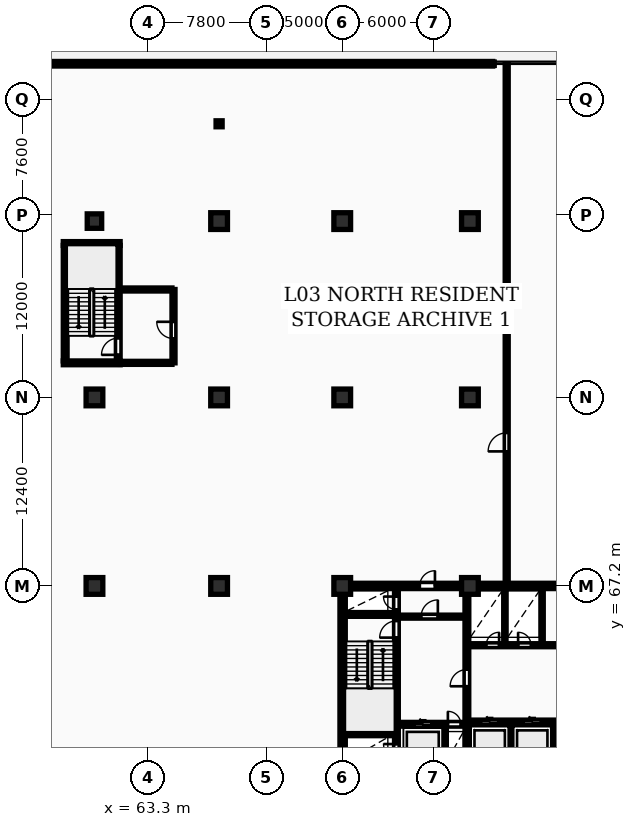
"""IFC4 building model, lengths in metres.
Left out: names, types, materials, properties, quantities, classifications, styles, units other than length and angle.
Written with IfcOpenShell. Run it as: python <this file> out.ifc"""

import sys

from ifc_helpers import new_model, si_unit, direction, frame, frame_2d, origin, origin_2d, place, context, subcontext, project, spatial, rectangle, circle, i_section, extrude, element, fill, save


model = new_model("IFC4")
c1 = context("Model", 3, precision=1e-05, world=origin(), true_north=direction((0.0, 1.0)))
c2 = subcontext(c1, "Body", "Model", "MODEL_VIEW")
j1 = project(units=[si_unit("LENGTHUNIT", "METRE"), si_unit("PLANEANGLEUNIT", "RADIAN")], contexts=[c1])
p1 = place(None, origin())
s1 = spatial("IfcSite", under=j1, at=p1, CompositionType="ELEMENT")
p2 = place(p1, origin())
s2 = spatial("IfcBuilding", under=s1, at=p2, CompositionType="ELEMENT")
p3 = place(p2, frame((0.0, 0.0, 14.5)))
s3 = spatial("IfcBuildingStorey", under=s2, at=p3, CompositionType="ELEMENT", Elevation=14.5)
for number, where, z_axis, x_axis in (
    (1, (59.8, 67.2, 0.0), (0.0, 0.0, 1.0), (1.0, 0.0, 0.0)),
    (2, (59.8, 79.6, 0.0), (0.0, 0.0, 1.0), (1.0, 0.0, 0.0)),
):
    element("IfcColumn", number, at=place(p3, frame(where, z_axis=z_axis, x_axis=x_axis)), inside=s3, PredefinedType="COLUMN", context=c2, shape_type="SweptSolid", body=[
        extrude(rectangle(XDim=1.1, YDim=1.1, at=origin_2d()), origin(), (0.0, 0.0, 1.0), 4.5),
    ])
p4 = place(p3, frame((59.8, 91.2, 0.0), z_axis=(0.0, 0.0, 1.0), x_axis=(1.0, 0.0, 0.0)))
e3 = element("IfcColumn", 3, at=p4, inside=s3, PredefinedType="COLUMN", context=c2, shape_type="SweptSolid", body=[
    extrude(circle(Radius=0.475, at=origin_2d()), origin(), (0.0, 0.0, 1.0), 4.5),
])
for number, where, z_axis, x_axis in (
    (4, (68.0, 67.2, 0.0), (0.0, 0.0, 1.0), (1.0, 0.0, 0.0)),
    (5, (68.0, 79.6, 0.0), (0.0, 0.0, 1.0), (1.0, 0.0, 0.0)),
    (6, (68.0, 91.2, 0.0), (0.0, 0.0, 1.0), (1.0, 0.0, 0.0)),
    (7, (76.1, 67.2, 0.0), (0.0, 0.0, 1.0), (1.0, 0.0, 0.0)),
    (8, (76.1, 79.6, 0.0), (0.0, 0.0, 1.0), (1.0, 0.0, 0.0)),
    (9, (76.1, 91.2, 0.0), (0.0, 0.0, 1.0), (1.0, 0.0, 0.0)),
    (10, (84.5, 67.2, 0.0), (0.0, 0.0, 1.0), (1.0, 0.0, 0.0)),
    (11, (84.5, 79.6, 0.0), (0.0, 0.0, 1.0), (1.0, 0.0, 0.0)),
    (12, (84.5, 91.2, 0.0), (0.0, 0.0, 1.0), (1.0, 0.0, 0.0)),
):
    element("IfcColumn", number, at=place(p3, frame(where, z_axis=z_axis, x_axis=x_axis)), inside=s3, PredefinedType="COLUMN", context=c2, shape_type="SweptSolid", body=[
        extrude(rectangle(XDim=1.1, YDim=1.1, at=origin_2d()), origin(), (0.0, 0.0, 1.0), 4.5),
    ])
p5 = place(p3, frame((68.0, 97.6, 0.0), z_axis=(0.0, 0.0, 1.0), x_axis=(1.0, 0.0, 0.0)))
e13 = element("IfcColumn", 13, at=p5, inside=s3, PredefinedType="COLUMN", context=c2, shape_type="SweptSolid", body=[
    extrude(i_section(OverallWidth=0.399, OverallDepth=0.394, WebThickness=0.023, FlangeThickness=0.037, FilletRadius=0.015, at=origin_2d()), origin(), (0.0, 0.0, 1.0), 4.5),
])
p6 = place(p3, frame((86.0, 101.55, 0.0), z_axis=(0.0, 0.0, 1.0), x_axis=(-1.0, 0.0, 0.0)))
e14 = element("IfcWall", 14, at=p6, inside=s3, PredefinedType="STANDARD", context=c2, shape_type="SweptSolid", body=[
    extrude(rectangle(XDim=34.5, YDim=0.3, at=frame_2d((17.25, 0.0))), origin(), (0.0, 0.0, 1.0), 4.18),
])
p7 = place(p3, frame((76.125, 55.375, 0.0), z_axis=(0.0, 0.0, 1.0), x_axis=(0.0, 1.0, 0.0)))
e15 = element("IfcWall", 15, at=p7, inside=s3, PredefinedType="SHEAR", context=c2, shape_type="SweptSolid", body=[
    extrude(rectangle(XDim=11.65, YDim=0.35, at=frame_2d((5.825, 0.0))), origin(), (0.0, 0.0, 1.0), 4.5),
])
p8 = place(p3, frame((75.95, 67.2, 0.0), z_axis=(0.0, 0.0, 1.0), x_axis=(1.0, 0.0, 0.0)))
e16 = element("IfcWall", 16, at=p8, inside=s3, PredefinedType="SHEAR", context=c2, shape_type="SweptSolid", body=[
    extrude(rectangle(XDim=36.3, YDim=0.35, at=frame_2d((18.15, 0.0))), origin(), (0.0, 0.0, 1.0), 4.5),
])
p9 = place(p8, frame((5.25, 0.0, 0.0)))
e17 = element("IfcOpeningElement", 17, at=p9, cuts=e16, PredefinedType="OPENING", context=c2, shape_type="SweptSolid", body=[
    extrude(rectangle(XDim=1.0, YDim=2.15, at=frame_2d((0.5, 1.075))), frame((0.0, 0.185, 0.0), z_axis=(0.0, -1.0, 0.0), x_axis=(1.0, 0.0, 0.0)), (0.0, 0.0, 1.0), 0.37),
])
p10 = place(p8, frame((21.6, 0.0, 0.0)))
e18 = element("IfcOpeningElement", 18, at=p10, cuts=e16, PredefinedType="OPENING", context=c2, shape_type="SweptSolid", body=[
    extrude(rectangle(XDim=1.5, YDim=2.2, at=frame_2d((0.75, 1.1))), frame((0.0, 0.185, 0.0), z_axis=(0.0, -1.0, 0.0), x_axis=(1.0, 0.0, 0.0)), (0.0, 0.0, 1.0), 0.37),
])
p11 = place(p8, frame((30.45, 0.0, 0.0)))
e19 = element("IfcOpeningElement", 19, at=p11, cuts=e16, PredefinedType="OPENING", context=c2, shape_type="SweptSolid", body=[
    extrude(rectangle(XDim=1.0, YDim=2.15, at=frame_2d((0.5, 1.075))), frame((0.0, 0.185, 0.0), z_axis=(0.0, -1.0, 0.0), x_axis=(1.0, 0.0, 0.0)), (0.0, 0.0, 1.0), 0.37),
])
p12 = place(p3, frame((79.665, 55.4, 0.0), z_axis=(0.0, 0.0, 1.0), x_axis=(0.0, 1.0, 0.0)))
e20 = element("IfcWall", 20, at=p12, inside=s3, PredefinedType="SHEAR", context=c2, shape_type="SweptSolid", body=[
    extrude(rectangle(XDim=11.6, YDim=0.25, at=frame_2d((5.8, 0.0))), origin(), (0.0, 0.0, 1.0), 4.5),
])
p13 = place(p12, frame((0.55, 0.0, 0.0)))
e21 = element("IfcOpeningElement", 21, at=p13, cuts=e20, PredefinedType="OPENING", context=c2, shape_type="SweptSolid", body=[
    extrude(rectangle(XDim=0.85, YDim=2.05, at=frame_2d((0.425, 1.025))), frame((0.0, 0.135, 0.0), z_axis=(0.0, -1.0, 0.0), x_axis=(1.0, 0.0, 0.0)), (0.0, 0.0, 1.0), 0.27),
])
p14 = place(p12, frame((8.4, 0.0, 0.0)))
e22 = element("IfcOpeningElement", 22, at=p14, cuts=e20, PredefinedType="OPENING", context=c2, shape_type="SweptSolid", body=[
    extrude(rectangle(XDim=1.1, YDim=2.1, at=frame_2d((0.55, 1.05))), frame((0.0, 0.135, 0.0), z_axis=(0.0, -1.0, 0.0), x_axis=(1.0, 0.0, 0.0)), (0.0, 0.0, 1.0), 0.27),
])
p15 = place(p12, frame((10.25, 0.0, 0.0)))
e23 = element("IfcOpeningElement", 23, at=p15, cuts=e20, PredefinedType="OPENING", context=c2, shape_type="SweptSolid", body=[
    extrude(rectangle(XDim=0.85, YDim=2.05, at=frame_2d((0.425, 1.025))), frame((0.0, 0.135, 0.0), z_axis=(0.0, -1.0, 0.0), x_axis=(1.0, 0.0, 0.0)), (0.0, 0.0, 1.0), 0.27),
])
for number, where, z_axis, x_axis in (
    (24, (76.3, 57.475, 0.0), (0.0, 0.0, 1.0), (1.0, 0.0, 0.0)),
    (25, (76.3, 65.325, 0.0), (0.0, 0.0, 1.0), (1.0, 0.0, 0.0)),
):
    element("IfcWall", number, at=place(p3, frame(where, z_axis=z_axis, x_axis=x_axis)), inside=s3, PredefinedType="SHEAR", context=c2, shape_type="SweptSolid", body=[
        extrude(rectangle(XDim=3.24, YDim=0.25, at=frame_2d((1.62, 0.0))), origin(), (0.0, 0.0, 1.0), 4.5),
    ])
p16 = place(p3, frame((79.79, 58.1, 0.0), z_axis=(0.0, 0.0, 1.0), x_axis=(1.0, 0.0, 0.0)))
e26 = element("IfcWall", 26, at=p16, inside=s3, PredefinedType="SHEAR", context=c2, shape_type="SweptSolid", body=[
    extrude(rectangle(XDim=4.39, YDim=0.25, at=frame_2d((2.195, 0.0))), origin(), (0.0, 0.0, 1.0), 4.5),
])
p17 = place(p16, frame((1.05, 0.0, 0.0)))
e27 = element("IfcOpeningElement", 27, at=p17, cuts=e26, PredefinedType="OPENING", context=c2, shape_type="SweptSolid", body=[
    extrude(rectangle(XDim=1.12, YDim=2.12, at=frame_2d((0.56, 1.06))), frame((0.0, 0.135, 0.0), z_axis=(0.0, -1.0, 0.0), x_axis=(1.0, 0.0, 0.0)), (0.0, 0.0, 1.0), 0.27),
])
p18 = place(p16, frame((3.26, 0.0, 0.0)))
e28 = element("IfcOpeningElement", 28, at=p18, cuts=e26, PredefinedType="OPENING", context=c2, shape_type="SweptSolid", body=[
    extrude(rectangle(XDim=0.85, YDim=2.05, at=frame_2d((0.425, 1.025))), frame((0.0, 0.135, 0.0), z_axis=(0.0, -1.0, 0.0), x_axis=(1.0, 0.0, 0.0)), (0.0, 0.0, 1.0), 0.27),
])
p19 = place(p3, frame((82.85, 55.4, 0.0), z_axis=(0.0, 0.0, 1.0), x_axis=(0.0, 1.0, 0.0)))
e29 = element("IfcWall", 29, at=p19, inside=s3, PredefinedType="PARTITIONING", context=c2, shape_type="SweptSolid", body=[
    extrude(rectangle(XDim=2.56, YDim=0.2, at=frame_2d((1.28, 0.0))), origin(), (0.0, 0.0, 1.0), 4.18),
])
p20 = place(p3, frame((79.79, 65.18, 0.0), z_axis=(0.0, 0.0, 1.0), x_axis=(1.0, 0.0, 0.0)))
e30 = element("IfcWall", 30, at=p20, inside=s3, PredefinedType="PARTITIONING", context=c2, shape_type="SweptSolid", body=[
    extrude(rectangle(XDim=4.39, YDim=0.2, at=frame_2d((2.195, 0.0))), origin(), (0.0, 0.0, 1.0), 4.18),
])
p21 = place(p20, frame((1.5, 0.0, 0.0)))
e31 = element("IfcOpeningElement", 31, at=p21, cuts=e30, PredefinedType="OPENING", context=c2, shape_type="SweptSolid", body=[
    extrude(rectangle(XDim=1.1, YDim=2.1, at=frame_2d((0.55, 1.05))), frame((0.0, 0.11, 0.0), z_axis=(0.0, -1.0, 0.0), x_axis=(1.0, 0.0, 0.0)), (0.0, 0.0, 1.0), 0.22),
])
p22 = place(p3, frame((84.3, 55.4, 0.0), z_axis=(0.0, 0.0, 1.0), x_axis=(0.0, 1.0, 0.0)))
e32 = element("IfcWall", 32, at=p22, inside=s3, PredefinedType="SHEAR", context=c2, shape_type="SweptSolid", body=[
    extrude(rectangle(XDim=11.6, YDim=0.25, at=frame_2d((5.8, 0.0))), origin(), (0.0, 0.0, 1.0), 4.5),
])
p23 = place(p22, frame((5.2, 0.0, 0.0)))
e33 = element("IfcOpeningElement", 33, at=p23, cuts=e32, PredefinedType="OPENING", context=c2, shape_type="SweptSolid", body=[
    extrude(rectangle(XDim=1.1, YDim=2.1, at=frame_2d((0.55, 1.05))), frame((0.0, 0.135, 0.0), z_axis=(0.0, -1.0, 0.0), x_axis=(1.0, 0.0, 0.0)), (0.0, 0.0, 1.0), 0.27),
])
for number, where, z_axis, x_axis in (
    (34, (87.2, 55.4, 0.0), (0.0, 0.0, 1.0), (0.0, 1.0, 0.0)),
    (35, (90.0, 55.4, 0.0), (0.0, 0.0, 1.0), (0.0, 1.0, 0.0)),
):
    element("IfcWall", number, at=place(p3, frame(where, z_axis=z_axis, x_axis=x_axis)), inside=s3, PredefinedType="PARTITIONING", context=c2, shape_type="SweptSolid", body=[
        extrude(rectangle(XDim=2.72, YDim=0.2, at=frame_2d((1.36, 0.0))), origin(), (0.0, 0.0, 1.0), 4.18),
    ])
p24 = place(p3, frame((84.42, 58.25, 0.0), z_axis=(0.0, 0.0, 1.0), x_axis=(1.0, 0.0, 0.0)))
e36 = element("IfcWall", 36, at=p24, inside=s3, PredefinedType="SHEAR", context=c2, shape_type="SweptSolid", body=[
    extrude(rectangle(XDim=8.36, YDim=0.25, at=frame_2d((4.18, 0.0))), origin(), (0.0, 0.0, 1.0), 4.5),
])
p25 = place(p24, frame((0.82, 0.0, 0.0)))
e37 = element("IfcOpeningElement", 37, at=p25, cuts=e36, PredefinedType="OPENING", context=c2, shape_type="SweptSolid", body=[
    extrude(rectangle(XDim=1.12, YDim=2.12, at=frame_2d((0.56, 1.06))), frame((0.0, 0.135, 0.0), z_axis=(0.0, -1.0, 0.0), x_axis=(1.0, 0.0, 0.0)), (0.0, 0.0, 1.0), 0.27),
])
p26 = place(p24, frame((3.62, 0.0, 0.0)))
e38 = element("IfcOpeningElement", 38, at=p26, cuts=e36, PredefinedType="OPENING", context=c2, shape_type="SweptSolid", body=[
    extrude(rectangle(XDim=1.12, YDim=2.12, at=frame_2d((0.56, 1.06))), frame((0.0, 0.135, 0.0), z_axis=(0.0, -1.0, 0.0), x_axis=(1.0, 0.0, 0.0)), (0.0, 0.0, 1.0), 0.27),
])
p27 = place(p24, frame((6.42, 0.0, 0.0)))
e39 = element("IfcOpeningElement", 39, at=p27, cuts=e36, PredefinedType="OPENING", context=c2, shape_type="SweptSolid", body=[
    extrude(rectangle(XDim=1.12, YDim=2.12, at=frame_2d((0.56, 1.06))), frame((0.0, 0.135, 0.0), z_axis=(0.0, -1.0, 0.0), x_axis=(1.0, 0.0, 0.0)), (0.0, 0.0, 1.0), 0.27),
])
for number, where, z_axis, x_axis in (
    (40, (86.8, 63.4, 0.0), (0.0, 0.0, 1.0), (0.0, 1.0, 0.0)),
    (41, (89.25, 63.4, 0.0), (0.0, 0.0, 1.0), (0.0, 1.0, 0.0)),
):
    element("IfcWall", number, at=place(p3, frame(where, z_axis=z_axis, x_axis=x_axis)), inside=s3, PredefinedType="PARTITIONING", context=c2, shape_type="SweptSolid", body=[
        extrude(rectangle(XDim=3.6, YDim=0.15, at=frame_2d((1.8, 0.0))), origin(), (0.0, 0.0, 1.0), 4.18),
    ])
p28 = place(p3, frame((84.42, 63.3, 0.0), z_axis=(0.0, 0.0, 1.0), x_axis=(1.0, 0.0, 0.0)))
e42 = element("IfcWall", 42, at=p28, inside=s3, PredefinedType="PARTITIONING", context=c2, shape_type="SweptSolid", body=[
    extrude(rectangle(XDim=19.83, YDim=0.2, at=frame_2d((9.915, 0.0))), origin(), (0.0, 0.0, 1.0), 4.18),
])
p29 = place(p28, frame((1.15, 0.0, 0.0)))
e43 = element("IfcOpeningElement", 43, at=p29, cuts=e42, PredefinedType="OPENING", context=c2, shape_type="SweptSolid", body=[
    extrude(rectangle(XDim=0.85, YDim=2.05, at=frame_2d((0.425, 1.025))), frame((0.0, 0.11, 0.0), z_axis=(0.0, -1.0, 0.0), x_axis=(1.0, 0.0, 0.0)), (0.0, 0.0, 1.0), 0.22),
])
p30 = place(p28, frame((3.25, 0.0, 0.0)))
e44 = element("IfcOpeningElement", 44, at=p30, cuts=e42, PredefinedType="OPENING", context=c2, shape_type="SweptSolid", body=[
    extrude(rectangle(XDim=0.85, YDim=2.05, at=frame_2d((0.425, 1.025))), frame((0.0, 0.11, 0.0), z_axis=(0.0, -1.0, 0.0), x_axis=(1.0, 0.0, 0.0)), (0.0, 0.0, 1.0), 0.22),
])
p31 = place(p28, frame((13.08, 0.0, 0.0)))
e45 = element("IfcOpeningElement", 45, at=p31, cuts=e42, PredefinedType="OPENING", context=c2, shape_type="SweptSolid", body=[
    extrude(rectangle(XDim=1.5, YDim=2.2, at=frame_2d((0.75, 1.1))), frame((0.0, 0.11, 0.0), z_axis=(0.0, -1.0, 0.0), x_axis=(1.0, 0.0, 0.0)), (0.0, 0.0, 1.0), 0.22),
])
p32 = place(p28, frame((6.78, 0.0, 0.0)))
e46 = element("IfcOpeningElement", 46, at=p32, cuts=e42, PredefinedType="OPENING", context=c2, shape_type="SweptSolid", body=[
    extrude(rectangle(XDim=0.92, YDim=2.08, at=frame_2d((0.46, 1.04))), frame((0.0, 0.11, 0.0), z_axis=(0.0, -1.0, 0.0), x_axis=(1.0, 0.0, 0.0)), (0.0, 0.0, 1.0), 0.22),
])
p33 = place(p28, frame((16.28, 0.0, 0.0)))
e47 = element("IfcOpeningElement", 47, at=p33, cuts=e42, PredefinedType="OPENING", context=c2, shape_type="SweptSolid", body=[
    extrude(rectangle(XDim=0.92, YDim=2.08, at=frame_2d((0.46, 1.04))), frame((0.0, 0.11, 0.0), z_axis=(0.0, -1.0, 0.0), x_axis=(1.0, 0.0, 0.0)), (0.0, 0.0, 1.0), 0.22),
])
p34 = place(p3, frame((57.875, 82.0, 0.0), z_axis=(0.0, 0.0, 1.0), x_axis=(0.0, 1.0, 0.0)))
e48 = element("IfcWall", 48, at=p34, inside=s3, PredefinedType="SHEAR", context=c2, shape_type="SweptSolid", body=[
    extrude(rectangle(XDim=7.6, YDim=0.25, at=frame_2d((3.8, 0.0))), origin(), (0.0, 0.0, 1.0), 4.5),
])
for number, where, z_axis, x_axis in (
    (49, (57.75, 81.875, 0.0), (0.0, 0.0, 1.0), (1.0, 0.0, 0.0)),
    (50, (57.75, 89.725, 0.0), (0.0, 0.0, 1.0), (1.0, 0.0, 0.0)),
):
    element("IfcWall", number, at=place(p3, frame(where, z_axis=z_axis, x_axis=x_axis)), inside=s3, PredefinedType="SHEAR", context=c2, shape_type="SweptSolid", body=[
        extrude(rectangle(XDim=3.74, YDim=0.25, at=frame_2d((1.87, 0.0))), origin(), (0.0, 0.0, 1.0), 4.5),
    ])
p35 = place(p3, frame((61.365, 82.0, 0.0), z_axis=(0.0, 0.0, 1.0), x_axis=(0.0, 1.0, 0.0)))
e51 = element("IfcWall", 51, at=p35, inside=s3, PredefinedType="SHEAR", context=c2, shape_type="SweptSolid", body=[
    extrude(rectangle(XDim=7.6, YDim=0.25, at=frame_2d((3.8, 0.0))), origin(), (0.0, 0.0, 1.0), 4.5),
])
p36 = place(p35, frame((0.4, 0.0, 0.0)))
e52 = element("IfcOpeningElement", 52, at=p36, cuts=e51, PredefinedType="OPENING", context=c2, shape_type="SweptSolid", body=[
    extrude(rectangle(XDim=1.1, YDim=2.1, at=frame_2d((0.55, 1.05))), frame((0.0, 0.135, 0.0), z_axis=(0.0, -1.0, 0.0), x_axis=(1.0, 0.0, 0.0)), (0.0, 0.0, 1.0), 0.27),
])
p37 = place(p3, frame((65.0, 81.875, 0.0), z_axis=(0.0, 0.0, 1.0), x_axis=(0.0, 1.0, 0.0)))
e53 = element("IfcWall", 53, at=p37, inside=s3, PredefinedType="PARTITIONING", context=c2, shape_type="SweptSolid", body=[
    extrude(rectangle(XDim=4.825, YDim=0.2, at=frame_2d((2.413, 0.0))), origin(), (0.0, 0.0, 1.0), 4.18),
])
p38 = place(p37, frame((1.6, 0.0, 0.0)))
e54 = element("IfcOpeningElement", 54, at=p38, cuts=e53, PredefinedType="OPENING", context=c2, shape_type="SweptSolid", body=[
    extrude(rectangle(XDim=1.1, YDim=2.15, at=frame_2d((0.55, 1.075))), frame((0.0, 0.11, 0.0), z_axis=(0.0, -1.0, 0.0), x_axis=(1.0, 0.0, 0.0)), (0.0, 0.0, 1.0), 0.22),
])
for number, where, z_axis, x_axis in (
    (55, (61.5, 81.875, 0.0), (0.0, 0.0, 1.0), (1.0, 0.0, 0.0)),
    (56, (61.5, 86.7, 0.0), (0.0, 0.0, 1.0), (1.0, 0.0, 0.0)),
):
    element("IfcWall", number, at=place(p3, frame(where, z_axis=z_axis, x_axis=x_axis)), inside=s3, PredefinedType="PARTITIONING", context=c2, shape_type="SweptSolid", body=[
        extrude(rectangle(XDim=3.4, YDim=0.2, at=frame_2d((1.7, 0.0))), origin(), (0.0, 0.0, 1.0), 4.18),
    ])
p39 = place(p3, frame((86.92, 67.4, 0.0), z_axis=(0.0, 0.0, 1.0), x_axis=(0.0, 1.0, 0.0)))
e57 = element("IfcWall", 57, at=p39, inside=s3, PredefinedType="PARTITIONING", context=c2, shape_type="SweptSolid", body=[
    extrude(rectangle(XDim=34.12, YDim=0.2, at=frame_2d((17.06, 0.0))), origin(), (0.0, 0.0, 1.0), 4.18),
])
p40 = place(p39, frame((8.65, 0.0, 0.0)))
e58 = element("IfcOpeningElement", 58, at=p40, cuts=e57, PredefinedType="OPENING", context=c2, shape_type="SweptSolid", body=[
    extrude(rectangle(XDim=1.22, YDim=2.18, at=frame_2d((0.61, 1.09))), frame((0.0, 0.11, 0.0), z_axis=(0.0, -1.0, 0.0), x_axis=(1.0, 0.0, 0.0)), (0.0, 0.0, 1.0), 0.22),
])
p41 = place(p9, origin())
e59 = element("IfcDoor", 59, at=p41, inside=s3, OperationType="SINGLE_SWING_RIGHT", PredefinedType="DOOR", context=c2, shape_type="SweptSolid", body=[
    extrude(rectangle(XDim=1.0, YDim=2.15, at=frame_2d((0.5, 1.075))), frame((0.0, 0.025, 0.0), z_axis=(0.0, -1.0, 0.0), x_axis=(1.0, 0.0, 0.0)), (0.0, 0.0, 1.0), 0.05),
])
fill(e17, e59)
p42 = place(p13, origin())
e60 = element("IfcDoor", 60, at=p42, inside=s3, OperationType="SINGLE_SWING_RIGHT", PredefinedType="DOOR", context=c2, shape_type="SweptSolid", body=[
    extrude(rectangle(XDim=0.85, YDim=2.05, at=frame_2d((0.425, 1.025))), frame((0.0, 0.025, 0.0), z_axis=(0.0, -1.0, 0.0), x_axis=(1.0, 0.0, 0.0)), (0.0, 0.0, 1.0), 0.05),
])
fill(e21, e60)
p43 = place(p14, origin())
e61 = element("IfcDoor", 61, at=p43, inside=s3, OperationType="SINGLE_SWING_LEFT", PredefinedType="DOOR", context=c2, shape_type="SweptSolid", body=[
    extrude(rectangle(XDim=1.1, YDim=2.1, at=frame_2d((0.55, 1.05))), frame((0.0, 0.025, 0.0), z_axis=(0.0, -1.0, 0.0), x_axis=(1.0, 0.0, 0.0)), (0.0, 0.0, 1.0), 0.05),
])
fill(e22, e61)
p44 = place(p15, origin())
e62 = element("IfcDoor", 62, at=p44, inside=s3, OperationType="SINGLE_SWING_RIGHT", PredefinedType="DOOR", context=c2, shape_type="SweptSolid", body=[
    extrude(rectangle(XDim=0.85, YDim=2.05, at=frame_2d((0.425, 1.025))), frame((0.0, 0.025, 0.0), z_axis=(0.0, -1.0, 0.0), x_axis=(1.0, 0.0, 0.0)), (0.0, 0.0, 1.0), 0.05),
])
fill(e23, e62)
p45 = place(p17, origin())
e63 = element("IfcDoor", 63, at=p45, inside=s3, OperationType="SLIDING_TO_LEFT", PredefinedType="DOOR", context=c2, shape_type="SweptSolid", body=[
    extrude(rectangle(XDim=1.12, YDim=2.12, at=frame_2d((0.56, 1.06))), frame((0.0, 0.025, 0.0), z_axis=(0.0, -1.0, 0.0), x_axis=(1.0, 0.0, 0.0)), (0.0, 0.0, 1.0), 0.05),
])
fill(e27, e63)
p46 = place(p18, origin())
e64 = element("IfcDoor", 64, at=p46, inside=s3, OperationType="SINGLE_SWING_LEFT", PredefinedType="DOOR", context=c2, shape_type="SweptSolid", body=[
    extrude(rectangle(XDim=0.85, YDim=2.05, at=frame_2d((0.425, 1.025))), frame((0.0, 0.025, 0.0), z_axis=(0.0, -1.0, 0.0), x_axis=(1.0, 0.0, 0.0)), (0.0, 0.0, 1.0), 0.05),
])
fill(e28, e64)
p47 = place(p21, origin())
e65 = element("IfcDoor", 65, at=p47, inside=s3, OperationType="SINGLE_SWING_RIGHT", PredefinedType="DOOR", context=c2, shape_type="SweptSolid", body=[
    extrude(rectangle(XDim=1.1, YDim=2.1, at=frame_2d((0.55, 1.05))), frame((0.0, 0.025, 0.0), z_axis=(0.0, -1.0, 0.0), x_axis=(1.0, 0.0, 0.0)), (0.0, 0.0, 1.0), 0.05),
])
fill(e31, e65)
p48 = place(p23, origin())
e66 = element("IfcDoor", 66, at=p48, inside=s3, OperationType="SINGLE_SWING_LEFT", PredefinedType="DOOR", context=c2, shape_type="SweptSolid", body=[
    extrude(rectangle(XDim=1.1, YDim=2.1, at=frame_2d((0.55, 1.05))), frame((0.0, 0.025, 0.0), z_axis=(0.0, -1.0, 0.0), x_axis=(1.0, 0.0, 0.0)), (0.0, 0.0, 1.0), 0.05),
])
fill(e33, e66)
p49 = place(p25, origin())
e67 = element("IfcDoor", 67, at=p49, inside=s3, OperationType="SLIDING_TO_LEFT", PredefinedType="DOOR", context=c2, shape_type="SweptSolid", body=[
    extrude(rectangle(XDim=1.12, YDim=2.12, at=frame_2d((0.56, 1.06))), frame((0.0, 0.025, 0.0), z_axis=(0.0, -1.0, 0.0), x_axis=(1.0, 0.0, 0.0)), (0.0, 0.0, 1.0), 0.05),
])
fill(e37, e67)
p50 = place(p26, origin())
e68 = element("IfcDoor", 68, at=p50, inside=s3, OperationType="SLIDING_TO_LEFT", PredefinedType="DOOR", context=c2, shape_type="SweptSolid", body=[
    extrude(rectangle(XDim=1.12, YDim=2.12, at=frame_2d((0.56, 1.06))), frame((0.0, 0.025, 0.0), z_axis=(0.0, -1.0, 0.0), x_axis=(1.0, 0.0, 0.0)), (0.0, 0.0, 1.0), 0.05),
])
fill(e38, e68)
p51 = place(p29, origin())
e69 = element("IfcDoor", 69, at=p51, inside=s3, OperationType="SINGLE_SWING_RIGHT", PredefinedType="DOOR", context=c2, shape_type="SweptSolid", body=[
    extrude(rectangle(XDim=0.85, YDim=2.05, at=frame_2d((0.425, 1.025))), frame((0.0, 0.025, 0.0), z_axis=(0.0, -1.0, 0.0), x_axis=(1.0, 0.0, 0.0)), (0.0, 0.0, 1.0), 0.05),
])
fill(e43, e69)
p52 = place(p30, origin())
e70 = element("IfcDoor", 70, at=p52, inside=s3, OperationType="SINGLE_SWING_LEFT", PredefinedType="DOOR", context=c2, shape_type="SweptSolid", body=[
    extrude(rectangle(XDim=0.85, YDim=2.05, at=frame_2d((0.425, 1.025))), frame((0.0, 0.025, 0.0), z_axis=(0.0, -1.0, 0.0), x_axis=(1.0, 0.0, 0.0)), (0.0, 0.0, 1.0), 0.05),
])
fill(e44, e70)
p53 = place(p36, origin())
e71 = element("IfcDoor", 71, at=p53, inside=s3, OperationType="SINGLE_SWING_LEFT", PredefinedType="DOOR", context=c2, shape_type="SweptSolid", body=[
    extrude(rectangle(XDim=1.1, YDim=2.1, at=frame_2d((0.55, 1.05))), frame((0.0, 0.025, 0.0), z_axis=(0.0, -1.0, 0.0), x_axis=(1.0, 0.0, 0.0)), (0.0, 0.0, 1.0), 0.05),
])
fill(e52, e71)
p54 = place(p38, origin())
e72 = element("IfcDoor", 72, at=p54, inside=s3, OperationType="SINGLE_SWING_RIGHT", PredefinedType="DOOR", context=c2, shape_type="SweptSolid", body=[
    extrude(rectangle(XDim=1.1, YDim=2.15, at=frame_2d((0.55, 1.075))), frame((0.0, 0.025, 0.0), z_axis=(0.0, -1.0, 0.0), x_axis=(1.0, 0.0, 0.0)), (0.0, 0.0, 1.0), 0.05),
])
fill(e54, e72)
p55 = place(p40, origin())
e73 = element("IfcDoor", 73, at=p55, inside=s3, OperationType="SINGLE_SWING_LEFT", PredefinedType="DOOR", context=c2, shape_type="SweptSolid", body=[
    extrude(rectangle(XDim=1.22, YDim=2.18, at=frame_2d((0.61, 1.09))), frame((0.0, 0.025, 0.0), z_axis=(0.0, -1.0, 0.0), x_axis=(1.0, 0.0, 0.0)), (0.0, 0.0, 1.0), 0.05),
])
fill(e58, e73)
save(model, sys.argv[1])
